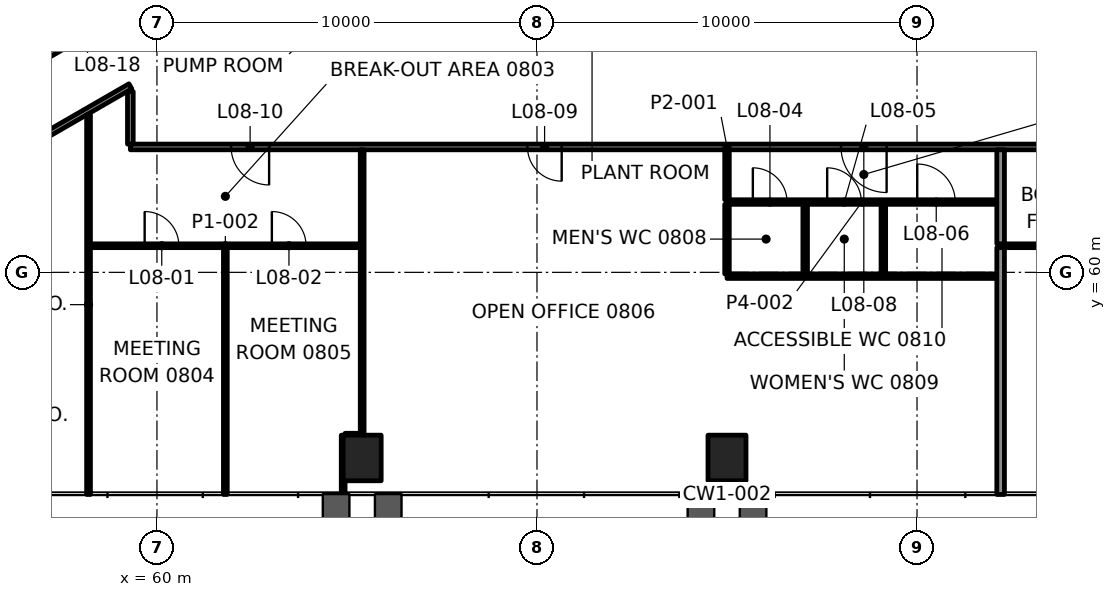
"""IFC4 building model, lengths in metres.
Left out: names, types, materials, properties, quantities, classifications, styles, units other than length and angle.
Written with IfcOpenShell. Run it as: python <this file> out.ifc"""

import sys

from ifc_helpers import new_model, si_unit, direction, frame, frame_2d, origin, origin_2d, place, context, subcontext, project, spatial, rectangle, extrude, element, fill, save


model = new_model("IFC4")
c1 = context("Model", 3, precision=1e-05, world=origin(), true_north=direction((0.0, 1.0)))
c2 = subcontext(c1, "Body", "Model", "MODEL_VIEW")
j1 = project(units=[si_unit("LENGTHUNIT", "METRE"), si_unit("PLANEANGLEUNIT", "RADIAN")], contexts=[c1])
p1 = place(None, origin())
s1 = spatial("IfcSite", under=j1, at=p1, CompositionType="ELEMENT")
p2 = place(p1, origin())
s2 = spatial("IfcBuilding", under=s1, at=p2, CompositionType="ELEMENT")
p3 = place(p2, frame((0.0, 0.0, 40.0)))
s3 = spatial("IfcBuildingStorey", under=s2, at=p3, CompositionType="ELEMENT", Elevation=40.0)
for number, where, z_axis, x_axis in (
    (1, (65.4, 55.115, -0.0), (0.0, 0.0, 1.0), (1.0, 0.0, 0.0)),
    (2, (75.0, 55.115, -0.0), (0.0, 0.0, 1.0), (1.0, 0.0, 0.0)),
):
    element("IfcColumn", number, at=place(p3, frame(where, z_axis=z_axis, x_axis=x_axis)), inside=s3, PredefinedType="COLUMN", context=c2, shape_type="SweptSolid", body=[
        extrude(rectangle(XDim=1.0, YDim=1.2, at=origin_2d()), origin(), (0.0, 0.0, 1.0), 4.2),
    ])
p4 = place(p3, frame((64.95, 55.715, 0.0), z_axis=(0.0, 0.0, 1.0), x_axis=(1.0, 0.0, 0.0)))
e3 = element("IfcWall", 3, at=p4, inside=s3, PredefinedType="PARTITIONING", context=c2, shape_type="SweptSolid", body=[
    extrude(rectangle(XDim=0.399, YDim=0.1, at=frame_2d((0.2, 0.0))), origin(), (0.0, 0.0, 1.0), 3.4),
])
p5 = place(p3, frame((75.0, 59.9, 0.0), z_axis=(0.0, 0.0, 1.0), x_axis=(1.0, 0.0, 0.0)))
e4 = element("IfcWall", 4, at=p5, inside=s3, PredefinedType="PARTITIONING", context=c2, shape_type="SweptSolid", body=[
    extrude(rectangle(XDim=7.1, YDim=0.12, at=frame_2d((3.55, 0.0))), origin(), (0.0, 0.0, 1.0), 3.4),
])
p6 = place(p3, frame((58.25, 60.7, 0.0), z_axis=(0.0, 0.0, 1.0), x_axis=(1.0, 0.0, 0.0)))
e5 = element("IfcWall", 5, at=p6, inside=s3, PredefinedType="PARTITIONING", context=c2, shape_type="SweptSolid", body=[
    extrude(rectangle(XDim=7.1, YDim=0.1, at=frame_2d((3.55, 0.0))), origin(), (0.0, 0.0, 1.0), 3.4),
])
p7 = place(p6, frame((1.427, 0.0, 0.0)))
e6 = element("IfcOpeningElement", 6, at=p7, cuts=e5, PredefinedType="OPENING", context=c2, shape_type="SweptSolid", body=[
    extrude(rectangle(XDim=0.9, YDim=2.1, at=frame_2d((0.45, 1.05))), frame((0.0, 0.06, 0.0), z_axis=(0.0, -1.0, 0.0), x_axis=(1.0, 0.0, 0.0)), (0.0, 0.0, 1.0), 0.12),
])
p8 = place(p6, frame((4.773, 0.0, 0.0)))
e7 = element("IfcOpeningElement", 7, at=p8, cuts=e5, PredefinedType="OPENING", context=c2, shape_type="SweptSolid", body=[
    extrude(rectangle(XDim=0.9, YDim=2.1, at=frame_2d((0.45, 1.05))), frame((0.0, 0.06, 0.0), z_axis=(0.0, -1.0, 0.0), x_axis=(1.0, 0.0, 0.0)), (0.0, 0.0, 1.0), 0.12),
])
p9 = place(p3, frame((82.2, 60.7, 0.0), z_axis=(0.0, 0.0, 1.0), x_axis=(1.0, 0.0, 0.0)))
e8 = element("IfcWall", 8, at=p9, inside=s3, PredefinedType="PARTITIONING", context=c2, shape_type="SweptSolid", body=[
    extrude(rectangle(XDim=10.468, YDim=0.1, at=frame_2d((5.234, 0.0))), origin(), (0.0, 0.0, 1.0), 3.4),
])
p10 = place(p9, frame((4.634, 0.0, 0.0)))
e9 = element("IfcOpeningElement", 9, at=p10, cuts=e8, PredefinedType="OPENING", context=c2, shape_type="SweptSolid", body=[
    extrude(rectangle(XDim=1.2, YDim=2.1, at=frame_2d((0.6, 1.05))), frame((0.0, 0.06, 0.0), z_axis=(0.0, -1.0, 0.0), x_axis=(1.0, 0.0, 0.0)), (0.0, 0.0, 1.0), 0.12),
])
p11 = place(p3, frame((75.0, 61.85, 0.0), z_axis=(0.0, 0.0, 1.0), x_axis=(1.0, 0.0, 0.0)))
e10 = element("IfcWall", 10, at=p11, inside=s3, PredefinedType="PARTITIONING", context=c2, shape_type="SweptSolid", body=[
    extrude(rectangle(XDim=7.1, YDim=0.12, at=frame_2d((3.55, 0.0))), origin(), (0.0, 0.0, 1.0), 3.4),
])
p12 = place(p11, frame((0.68, 0.0, 0.0)))
e11 = element("IfcOpeningElement", 11, at=p12, cuts=e10, PredefinedType="OPENING", context=c2, shape_type="SweptSolid", body=[
    extrude(rectangle(XDim=0.9, YDim=2.1, at=frame_2d((0.45, 1.05))), frame((0.0, 0.07, 0.0), z_axis=(0.0, -1.0, 0.0), x_axis=(1.0, 0.0, 0.0)), (0.0, 0.0, 1.0), 0.14),
])
p13 = place(p11, frame((2.636, 0.0, 0.0)))
e12 = element("IfcOpeningElement", 12, at=p13, cuts=e10, PredefinedType="OPENING", context=c2, shape_type="SweptSolid", body=[
    extrude(rectangle(XDim=0.9, YDim=2.1, at=frame_2d((0.45, 1.05))), frame((0.0, 0.07, 0.0), z_axis=(0.0, -1.0, 0.0), x_axis=(1.0, 0.0, 0.0)), (0.0, 0.0, 1.0), 0.14),
])
p14 = place(p11, frame((5.006, 0.0, 0.0)))
e13 = element("IfcOpeningElement", 13, at=p14, cuts=e10, PredefinedType="OPENING", context=c2, shape_type="SweptSolid", body=[
    extrude(rectangle(XDim=1.0, YDim=2.1, at=frame_2d((0.5, 1.05))), frame((0.0, 0.07, 0.0), z_axis=(0.0, -1.0, 0.0), x_axis=(1.0, 0.0, 0.0)), (0.0, 0.0, 1.0), 0.14),
])
p15 = place(p3, frame((90.7, 63.3, 0.0), z_axis=(0.0, 0.0, 1.0), x_axis=(-1.0, 0.0, 0.0)))
e14 = element("IfcWall", 14, at=p15, inside=s3, PredefinedType="PARTITIONING", context=c2, shape_type="SweptSolid", body=[
    extrude(rectangle(XDim=31.4, YDim=0.15, at=frame_2d((15.7, 0.0))), origin(), (0.0, 0.0, 1.0), 3.4),
])
p16 = place(p15, frame((3.852, 0.0, 0.0)))
e15 = element("IfcOpeningElement", 15, at=p16, cuts=e14, PredefinedType="OPENING", context=c2, shape_type="SweptSolid", body=[
    extrude(rectangle(XDim=1.0, YDim=2.1, at=frame_2d((0.5, 1.05))), frame((0.0, 0.085, 0.0), z_axis=(0.0, -1.0, 0.0), x_axis=(1.0, 0.0, 0.0)), (0.0, 0.0, 1.0), 0.17),
])
p17 = place(p15, frame((11.5, 0.0, 0.0)))
e16 = element("IfcOpeningElement", 16, at=p17, cuts=e14, PredefinedType="OPENING", context=c2, shape_type="SweptSolid", body=[
    extrude(rectangle(XDim=1.2, YDim=2.1, at=frame_2d((0.6, 1.05))), frame((0.0, 0.085, 0.0), z_axis=(0.0, -1.0, 0.0), x_axis=(1.0, 0.0, 0.0)), (0.0, 0.0, 1.0), 0.17),
])
p18 = place(p15, frame((20.05, 0.0, 0.0)))
e17 = element("IfcOpeningElement", 17, at=p18, cuts=e14, PredefinedType="OPENING", context=c2, shape_type="SweptSolid", body=[
    extrude(rectangle(XDim=0.9, YDim=2.1, at=frame_2d((0.45, 1.05))), frame((0.0, 0.085, 0.0), z_axis=(0.0, -1.0, 0.0), x_axis=(1.0, 0.0, 0.0)), (0.0, 0.0, 1.0), 0.17),
])
p19 = place(p15, frame((27.749, 0.0, 0.0)))
e18 = element("IfcOpeningElement", 18, at=p19, cuts=e14, PredefinedType="OPENING", context=c2, shape_type="SweptSolid", body=[
    extrude(rectangle(XDim=1.0, YDim=2.1, at=frame_2d((0.5, 1.05))), frame((0.0, 0.085, 0.0), z_axis=(0.0, -1.0, 0.0), x_axis=(1.0, 0.0, 0.0)), (0.0, 0.0, 1.0), 0.17),
])
p20 = place(p3, frame((59.3, 64.896, 0.0), z_axis=(0.0, 0.0, 1.0), x_axis=(-0.866022774611, -0.500004553834, 0.0)))
e19 = element("IfcWall", 19, at=p20, inside=s3, PredefinedType="PARTITIONING", context=c2, shape_type="SweptSolid", body=[
    extrude(rectangle(XDim=13.185, YDim=0.15, at=frame_2d((6.593, 0.0))), origin(), (0.0, 0.0, 1.0), 3.247),
])
p21 = place(p20, frame((6.676, 0.0, 0.0)))
e20 = element("IfcOpeningElement", 20, at=p21, cuts=e19, PredefinedType="OPENING", context=c2, shape_type="SweptSolid", body=[
    extrude(rectangle(XDim=0.9, YDim=2.1, at=frame_2d((0.45, 1.05))), frame((0.0, 0.085, 0.0), z_axis=(0.0, -1.0, 0.0), x_axis=(1.0, 0.0, 0.0)), (0.0, 0.0, 1.0), 0.17),
])
p22 = place(p3, frame((46.981, 59.863, 0.0), z_axis=(0.0, 0.0, 1.0), x_axis=(0.866023110832, 0.500003971489, 0.0)))
e21 = element("IfcWall", 21, at=p22, inside=s3, PredefinedType="PARTITIONING", context=c2, shape_type="SweptSolid", body=[
    extrude(rectangle(XDim=14.138, YDim=0.15, at=frame_2d((7.069, 0.0))), origin(), (0.0, 0.0, 1.0), 3.4),
])
p23 = place(p22, frame((5.559, 0.0, 0.0)))
e22 = element("IfcOpeningElement", 22, at=p23, cuts=e21, PredefinedType="OPENING", context=c2, shape_type="SweptSolid", body=[
    extrude(rectangle(XDim=1.0, YDim=2.1, at=frame_2d((0.5, 1.05))), frame((0.0, 0.085, 0.0), z_axis=(0.0, -1.0, 0.0), x_axis=(1.0, 0.0, 0.0)), (0.0, 0.0, 1.0), 0.17),
])
p24 = place(p22, frame((12.475, 0.0, 0.0)))
e23 = element("IfcOpeningElement", 23, at=p24, cuts=e21, PredefinedType="OPENING", context=c2, shape_type="SweptSolid", body=[
    extrude(rectangle(XDim=0.9, YDim=2.1, at=frame_2d((0.45, 1.05))), frame((0.0, 0.085, 0.0), z_axis=(0.0, -1.0, 0.0), x_axis=(1.0, 0.0, 0.0)), (0.0, 0.0, 1.0), 0.17),
])
p25 = place(p3, frame((82.2, 54.155, 0.0), z_axis=(0.0, 0.0, 1.0), x_axis=(0.0, 1.0, 0.0)))
e24 = element("IfcWall", 24, at=p25, inside=s3, PredefinedType="PARTITIONING", context=c2, shape_type="SweptSolid", body=[
    extrude(rectangle(XDim=6.495, YDim=0.2, at=frame_2d((3.247, 0.0))), origin(), (0.0, 0.0, 1.0), 3.165),
])
for number, where, z_axis, x_axis in (
    (25, (79.114, 59.96, 0.0), (0.0, 0.0, 1.0), (0.0, 1.0, 0.0)),
    (26, (77.057, 59.96, 0.0), (0.0, 0.0, 1.0), (0.0, 1.0, 0.0)),
    (27, (75.0, 59.96, 0.0), (0.0, 0.0, 1.0), (0.0, 1.0, 0.0)),
):
    element("IfcWall", number, at=place(p3, frame(where, z_axis=z_axis, x_axis=x_axis)), inside=s3, PredefinedType="PARTITIONING", context=c2, shape_type="SweptSolid", body=[
        extrude(rectangle(XDim=1.83, YDim=0.12, at=frame_2d((0.915, 0.0))), origin(), (0.0, 0.0, 1.0), 3.4),
    ])
p26 = place(p3, frame((65.4, 55.716, 0.0), z_axis=(0.0, 0.0, 1.0), x_axis=(0.0, 1.0, 0.0)))
e28 = element("IfcWall", 28, at=p26, inside=s3, PredefinedType="PARTITIONING", context=c2, shape_type="SweptSolid", body=[
    extrude(rectangle(XDim=7.509, YDim=0.1, at=frame_2d((3.755, 0.0))), origin(), (0.0, 0.0, 1.0), 3.4),
])
p27 = place(p3, frame((64.9, 54.155, 0.0), z_axis=(0.0, 0.0, 1.0), x_axis=(0.0, 1.0, 0.0)))
e29 = element("IfcWall", 29, at=p27, inside=s3, PredefinedType="PARTITIONING", context=c2, shape_type="SweptSolid", body=[
    extrude(rectangle(XDim=1.56, YDim=0.1, at=frame_2d((0.78, 0.0))), origin(), (0.0, 0.0, 1.0), 3.165),
])
p28 = place(p3, frame((61.8, 54.155, 0.0), z_axis=(0.0, 0.0, 1.0), x_axis=(0.0, 1.0, 0.0)))
e30 = element("IfcWall", 30, at=p28, inside=s3, PredefinedType="PARTITIONING", context=c2, shape_type="SweptSolid", body=[
    extrude(rectangle(XDim=6.495, YDim=0.1, at=frame_2d((3.247, 0.0))), origin(), (0.0, 0.0, 1.0), 3.165),
])
p29 = place(p3, frame((59.3, 63.375, 0.0), z_axis=(0.0, 0.0, 1.0), x_axis=(0.0, 1.0, 0.0)))
e31 = element("IfcWall", 31, at=p29, inside=s3, PredefinedType="PARTITIONING", context=c2, shape_type="SweptSolid", body=[
    extrude(rectangle(XDim=1.385, YDim=0.15, at=frame_2d((0.692, 0.0))), origin(), (0.0, 0.0, 1.0), 3.247),
])
p30 = place(p3, frame((58.2, 54.155, 0.0), z_axis=(0.0, 0.0, 1.0), x_axis=(0.0, 1.0, 0.0)))
e32 = element("IfcWall", 32, at=p30, inside=s3, PredefinedType="PARTITIONING", context=c2, shape_type="SweptSolid", body=[
    extrude(rectangle(XDim=9.99, YDim=0.1, at=frame_2d((4.995, 0.0))), origin(), (0.0, 0.0, 1.0), 3.165),
])
p31 = place(p3, frame((82.2, 60.75, 0.0), z_axis=(0.0, 0.0, 1.0), x_axis=(0.0, 1.0, 0.0)))
e33 = element("IfcWall", 33, at=p31, inside=s3, PredefinedType="PARTITIONING", context=c2, shape_type="SweptSolid", body=[
    extrude(rectangle(XDim=2.475, YDim=0.2, at=frame_2d((1.238, 0.0))), origin(), (0.0, 0.0, 1.0), 3.4),
])
p32 = place(p3, frame((75.0, 61.91, 0.0), z_axis=(0.0, 0.0, 1.0), x_axis=(0.0, 1.0, 0.0)))
e34 = element("IfcWall", 34, at=p32, inside=s3, PredefinedType="PARTITIONING", context=c2, shape_type="SweptSolid", body=[
    extrude(rectangle(XDim=1.315, YDim=0.12, at=frame_2d((0.658, 0.0))), origin(), (0.0, 0.0, 1.0), 3.4),
])
p33 = place(p7, origin())
e35 = element("IfcDoor", 35, at=p33, inside=s3, OperationType="SINGLE_SWING_LEFT", PredefinedType="DOOR", context=c2, shape_type="SweptSolid", body=[
    extrude(rectangle(XDim=0.9, YDim=2.1, at=frame_2d((0.45, 1.05))), frame((0.0, 0.025, 0.0), z_axis=(0.0, -1.0, 0.0), x_axis=(1.0, 0.0, 0.0)), (0.0, 0.0, 1.0), 0.05),
])
fill(e6, e35)
p34 = place(p8, origin())
e36 = element("IfcDoor", 36, at=p34, inside=s3, OperationType="SINGLE_SWING_RIGHT", PredefinedType="DOOR", context=c2, shape_type="SweptSolid", body=[
    extrude(rectangle(XDim=0.9, YDim=2.1, at=frame_2d((0.45, 1.05))), frame((0.0, 0.025, 0.0), z_axis=(0.0, -1.0, 0.0), x_axis=(1.0, 0.0, 0.0)), (0.0, 0.0, 1.0), 0.05),
])
fill(e7, e36)
p35 = place(p12, origin())
e37 = element("IfcDoor", 37, at=p35, inside=s3, OperationType="SINGLE_SWING_LEFT", PredefinedType="DOOR", context=c2, shape_type="SweptSolid", body=[
    extrude(rectangle(XDim=0.9, YDim=2.1, at=frame_2d((0.45, 1.05))), frame((0.0, 0.025, 0.0), z_axis=(0.0, -1.0, 0.0), x_axis=(1.0, 0.0, 0.0)), (0.0, 0.0, 1.0), 0.05),
])
fill(e11, e37)
p36 = place(p13, origin())
e38 = element("IfcDoor", 38, at=p36, inside=s3, OperationType="SINGLE_SWING_RIGHT", PredefinedType="DOOR", context=c2, shape_type="SweptSolid", body=[
    extrude(rectangle(XDim=0.9, YDim=2.1, at=frame_2d((0.45, 1.05))), frame((0.0, 0.025, 0.0), z_axis=(0.0, -1.0, 0.0), x_axis=(1.0, 0.0, 0.0)), (0.0, 0.0, 1.0), 0.05),
])
fill(e12, e38)
p37 = place(p14, origin())
e39 = element("IfcDoor", 39, at=p37, inside=s3, OperationType="SINGLE_SWING_LEFT", PredefinedType="DOOR", context=c2, shape_type="SweptSolid", body=[
    extrude(rectangle(XDim=1.0, YDim=2.1, at=frame_2d((0.5, 1.05))), frame((0.0, 0.025, 0.0), z_axis=(0.0, -1.0, 0.0), x_axis=(1.0, 0.0, 0.0)), (0.0, 0.0, 1.0), 0.05),
])
fill(e13, e39)
p38 = place(p17, origin())
e40 = element("IfcDoor", 40, at=p38, inside=s3, OperationType="DOUBLE_DOOR_SINGLE_SWING", PredefinedType="DOOR", context=c2, shape_type="SweptSolid", body=[
    extrude(rectangle(XDim=1.2, YDim=2.1, at=frame_2d((0.6, 1.05))), frame((0.0, 0.025, 0.0), z_axis=(0.0, -1.0, 0.0), x_axis=(1.0, 0.0, 0.0)), (0.0, 0.0, 1.0), 0.05),
])
fill(e16, e40)
p39 = place(p18, origin())
e41 = element("IfcDoor", 41, at=p39, inside=s3, OperationType="SINGLE_SWING_RIGHT", PredefinedType="DOOR", context=c2, shape_type="SweptSolid", body=[
    extrude(rectangle(XDim=0.9, YDim=2.1, at=frame_2d((0.45, 1.05))), frame((0.0, 0.025, 0.0), z_axis=(0.0, -1.0, 0.0), x_axis=(1.0, 0.0, 0.0)), (0.0, 0.0, 1.0), 0.05),
])
fill(e17, e41)
p40 = place(p19, origin())
e42 = element("IfcDoor", 42, at=p40, inside=s3, OperationType="SINGLE_SWING_LEFT", PredefinedType="DOOR", context=c2, shape_type="SweptSolid", body=[
    extrude(rectangle(XDim=1.0, YDim=2.1, at=frame_2d((0.5, 1.05))), frame((0.0, 0.025, 0.0), z_axis=(0.0, -1.0, 0.0), x_axis=(1.0, 0.0, 0.0)), (0.0, 0.0, 1.0), 0.05),
])
fill(e18, e42)
save(model, sys.argv[1])
